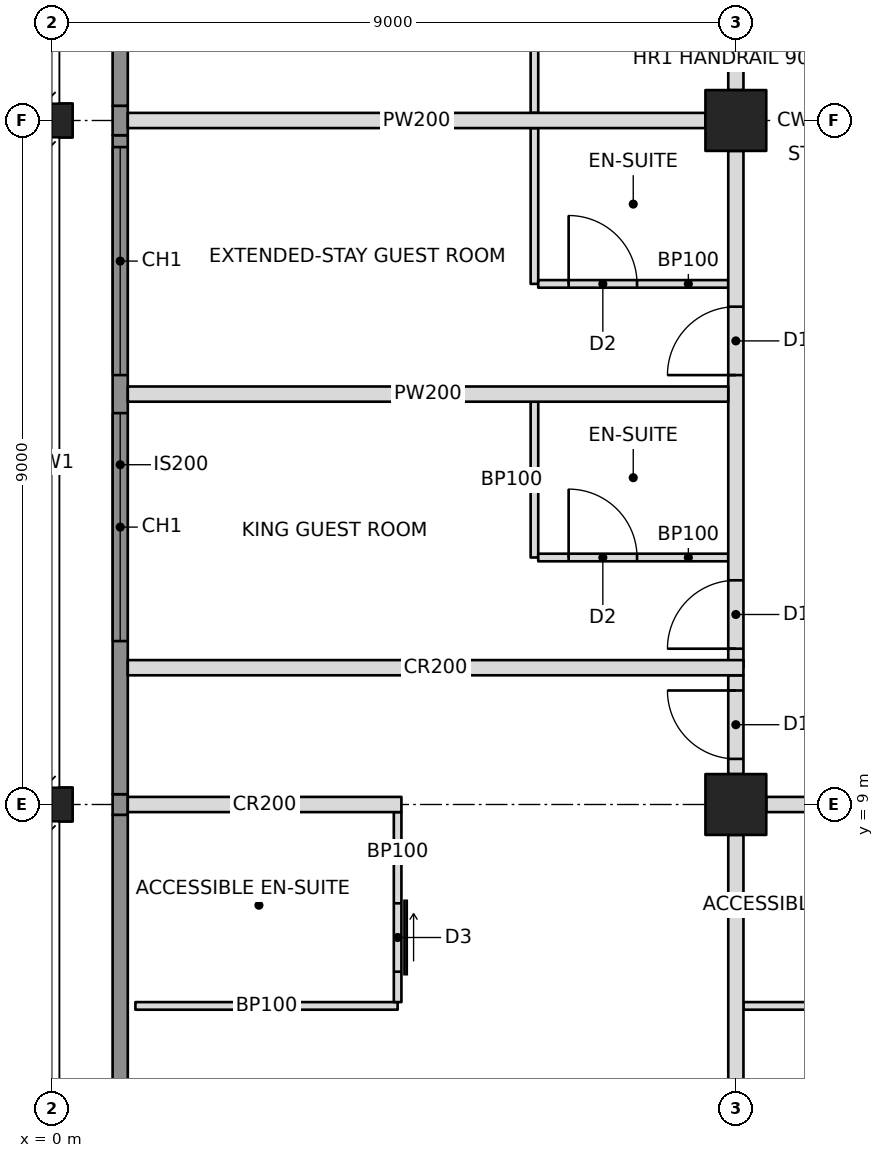
"""IFC4 building model, lengths in metres.
Left out: names, types, materials, properties, quantities, classifications, styles, units other than length and angle.
Written with IfcOpenShell. Run it as: python <this file> out.ifc"""

import sys

from ifc_helpers import new_model, si_unit, direction, frame, frame_2d, origin, origin_2d, place, context, subcontext, project, spatial, rectangle, hollow_rectangle, i_section, extrude, element, fill, save


model = new_model("IFC4")
c1 = context("Model", 3, precision=1e-05, world=origin(), true_north=direction((0.0, 1.0)))
c2 = subcontext(c1, "Body", "Model", "MODEL_VIEW")
j1 = project(units=[si_unit("LENGTHUNIT", "METRE"), si_unit("PLANEANGLEUNIT", "RADIAN")], contexts=[c1])
p1 = place(None, origin())
s1 = spatial("IfcSite", under=j1, at=p1, CompositionType="ELEMENT")
p2 = place(p1, origin())
s2 = spatial("IfcBuilding", under=s1, at=p2, CompositionType="ELEMENT")
p3 = place(p2, frame((0.0, 0.0, 170.6)))
s3 = spatial("IfcBuildingStorey", under=s2, at=p3, CompositionType="ELEMENT", Elevation=170.6)
for number, where, z_axis, x_axis in (
    (1, (0.0, 9.0, 0.0), (0.0, 0.0, 1.0), (0.0, 1.0, 0.0)),
    (2, (0.0, 18.0, 0.0), (0.0, 0.0, 1.0), (0.0, 1.0, 0.0)),
):
    element("IfcColumn", number, at=place(p3, frame(where, z_axis=z_axis, x_axis=x_axis)), inside=s3, PredefinedType="COLUMN", context=c2, shape_type="SweptSolid", body=[
        extrude(i_section(OverallWidth=0.449, OverallDepth=0.549, WebThickness=0.072, FlangeThickness=0.115, at=origin_2d()), origin(), (0.0, 0.0, 1.0), 3.4),
    ])
for number, where, z_axis, x_axis in (
    (3, (9.0, 9.0, 0.0), (0.0, 0.0, 1.0), (1.0, 0.0, 0.0)),
    (4, (9.0, 18.0, 0.0), (0.0, 0.0, 1.0), (1.0, 0.0, 0.0)),
):
    element("IfcColumn", number, at=place(p3, frame(where, z_axis=z_axis, x_axis=x_axis)), inside=s3, PredefinedType="COLUMN", context=c2, shape_type="SweptSolid", body=[
        extrude(hollow_rectangle(XDim=0.8, YDim=0.8, WallThickness=0.06, at=origin_2d()), origin(), (0.0, 0.0, 1.0), 3.4),
    ])
p4 = place(p3, frame((1.0, 9.0, 0.0), z_axis=(0.0, 0.0, 1.0), x_axis=(1.0, 0.0, 0.0)))
e5 = element("IfcWall", 5, at=p4, inside=s3, PredefinedType="PARTITIONING", context=c2, shape_type="SweptSolid", body=[
    extrude(rectangle(XDim=3.6, YDim=0.2, at=frame_2d((1.8, 0.0))), origin(), (0.0, 0.0, 1.0), 2.438),
])
p5 = place(p3, frame((9.4, 9.0, 0.0), z_axis=(0.0, 0.0, 1.0), x_axis=(1.0, 0.0, 0.0)))
e6 = element("IfcWall", 6, at=p5, inside=s3, PredefinedType="PARTITIONING", context=c2, shape_type="SweptSolid", body=[
    extrude(rectangle(XDim=8.2, YDim=0.2, at=frame_2d((4.1, 0.0))), origin(), (0.0, 0.0, 1.0), 2.405),
])
p6 = place(p5, frame((2.95, 0.0, 0.0)))
e7 = element("IfcOpeningElement", 7, at=p6, cuts=e6, PredefinedType="OPENING", context=c2, shape_type="SweptSolid", body=[
    extrude(rectangle(XDim=0.9, YDim=2.1, at=frame_2d((0.45, 1.05))), frame((0.0, 0.11, 0.0), z_axis=(0.0, -1.0, 0.0), x_axis=(1.0, 0.0, 0.0)), (0.0, 0.0, 1.0), 0.22),
])
p7 = place(p5, frame((4.35, 0.0, 0.0)))
e8 = element("IfcOpeningElement", 8, at=p7, cuts=e6, PredefinedType="OPENING", context=c2, shape_type="SweptSolid", body=[
    extrude(rectangle(XDim=0.9, YDim=2.1, at=frame_2d((0.45, 1.05))), frame((0.0, 0.11, 0.0), z_axis=(0.0, -1.0, 0.0), x_axis=(1.0, 0.0, 0.0)), (0.0, 0.0, 1.0), 0.22),
])
p8 = place(p3, frame((9.0, 10.8, 0.0), z_axis=(0.0, 0.0, 1.0), x_axis=(0.0, 1.0, 0.0)))
e9 = element("IfcWall", 9, at=p8, inside=s3, PredefinedType="PARTITIONING", context=c2, shape_type="SweptSolid", body=[
    extrude(rectangle(XDim=6.8, YDim=0.2, at=frame_2d((3.4, 0.0))), origin(), (0.0, 0.0, 1.0), 2.405),
])
p9 = place(p8, frame((0.25, 0.0, 0.0)))
e10 = element("IfcOpeningElement", 10, at=p9, cuts=e9, PredefinedType="OPENING", context=c2, shape_type="SweptSolid", body=[
    extrude(rectangle(XDim=0.9, YDim=2.1, at=frame_2d((0.45, 1.05))), frame((0.0, 0.11, 0.0), z_axis=(0.0, -1.0, 0.0), x_axis=(1.0, 0.0, 0.0)), (0.0, 0.0, 1.0), 0.22),
])
p10 = place(p8, frame((3.85, 0.0, 0.0)))
e11 = element("IfcOpeningElement", 11, at=p10, cuts=e9, PredefinedType="OPENING", context=c2, shape_type="SweptSolid", body=[
    extrude(rectangle(XDim=0.9, YDim=2.1, at=frame_2d((0.45, 1.05))), frame((0.0, 0.11, 0.0), z_axis=(0.0, -1.0, 0.0), x_axis=(1.0, 0.0, 0.0)), (0.0, 0.0, 1.0), 0.22),
])
p11 = place(p3, frame((9.0, 18.4, 0.0), z_axis=(0.0, 0.0, 1.0), x_axis=(0.0, 1.0, 0.0)))
e12 = element("IfcWall", 12, at=p11, inside=s3, PredefinedType="PARTITIONING", context=c2, shape_type="SweptSolid", body=[
    extrude(rectangle(XDim=8.2, YDim=0.2, at=frame_2d((4.1, 0.0))), origin(), (0.0, 0.0, 1.0), 2.405),
])
p12 = place(p11, frame((5.65, 0.0, 0.0)))
e13 = element("IfcOpeningElement", 13, at=p12, cuts=e12, PredefinedType="OPENING", context=c2, shape_type="SweptSolid", body=[
    extrude(rectangle(XDim=0.9, YDim=2.1, at=frame_2d((0.45, 1.05))), frame((0.0, 0.11, 0.0), z_axis=(0.0, -1.0, 0.0), x_axis=(1.0, 0.0, 0.0)), (0.0, 0.0, 1.0), 0.22),
])
p13 = place(p3, frame((1.0, 10.8, 0.0), z_axis=(0.0, 0.0, 1.0), x_axis=(1.0, 0.0, 0.0)))
e14 = element("IfcWall", 14, at=p13, inside=s3, PredefinedType="PARTITIONING", context=c2, shape_type="SweptSolid", body=[
    extrude(rectangle(XDim=8.1, YDim=0.2, at=frame_2d((4.05, 0.0))), origin(), (0.0, 0.0, 1.0), 2.404),
])
p14 = place(p3, frame((9.0, 8.6, 0.0), z_axis=(0.0, 0.0, 1.0), x_axis=(0.0, -1.0, 0.0)))
e15 = element("IfcWall", 15, at=p14, inside=s3, PredefinedType="PARTITIONING", context=c2, shape_type="SweptSolid", body=[
    extrude(rectangle(XDim=7.6, YDim=0.2, at=frame_2d((3.8, 0.0))), origin(), (0.0, 0.0, 1.0), 2.438),
])
p15 = place(p3, frame((1.1, 6.35, 0.0), z_axis=(0.0, 0.0, 1.0), x_axis=(1.0, 0.0, 0.0)))
e16 = element("IfcWall", 16, at=p15, inside=s3, PredefinedType="PARTITIONING", context=c2, shape_type="SweptSolid", body=[
    extrude(rectangle(XDim=3.45, YDim=0.1, at=frame_2d((1.725, 0.0))), origin(), (0.0, 0.0, 1.0), 3.2),
])
p16 = place(p3, frame((4.55, 8.9, 0.0), z_axis=(0.0, 0.0, 1.0), x_axis=(0.0, -1.0, 0.0)))
e17 = element("IfcWall", 17, at=p16, inside=s3, PredefinedType="PARTITIONING", context=c2, shape_type="SweptSolid", body=[
    extrude(rectangle(XDim=2.5, YDim=0.1, at=frame_2d((1.25, 0.0))), origin(), (0.0, 0.0, 1.0), 2.438),
])
p17 = place(p16, frame((1.2, 0.0, 0.0)))
e18 = element("IfcOpeningElement", 18, at=p17, cuts=e17, PredefinedType="OPENING", context=c2, shape_type="SweptSolid", body=[
    extrude(rectangle(XDim=0.9, YDim=2.1, at=frame_2d((0.45, 1.05))), frame((0.0, 0.06, 0.0), z_axis=(0.0, -1.0, 0.0), x_axis=(1.0, 0.0, 0.0)), (0.0, 0.0, 1.0), 0.12),
])
p18 = place(p3, frame((9.1, 6.35, 0.0), z_axis=(0.0, 0.0, 1.0), x_axis=(1.0, 0.0, 0.0)))
e19 = element("IfcWall", 19, at=p18, inside=s3, PredefinedType="PARTITIONING", context=c2, shape_type="SweptSolid", body=[
    extrude(rectangle(XDim=2.95, YDim=0.1, at=frame_2d((1.475, 0.0))), origin(), (0.0, 0.0, 1.0), 2.438),
])
p19 = place(p3, frame((8.9, 14.4, 0.0), z_axis=(0.0, 0.0, 1.0), x_axis=(-1.0, 0.0, 0.0)))
e20 = element("IfcWall", 20, at=p19, inside=s3, PredefinedType="PARTITIONING", context=c2, shape_type="SweptSolid", body=[
    extrude(rectangle(XDim=7.9, YDim=0.2, at=frame_2d((3.95, 0.0))), origin(), (0.0, 0.0, 1.0), 2.404),
])
p20 = place(p3, frame((8.6, 18.0, 0.0), z_axis=(0.0, 0.0, 1.0), x_axis=(-1.0, 0.0, 0.0)))
e21 = element("IfcWall", 21, at=p20, inside=s3, PredefinedType="PARTITIONING", context=c2, shape_type="SweptSolid", body=[
    extrude(rectangle(XDim=7.6, YDim=0.2, at=frame_2d((3.8, 0.0))), origin(), (0.0, 0.0, 1.0), 2.405),
])
p21 = place(p3, frame((6.35, 12.25, 0.0), z_axis=(0.0, 0.0, 1.0), x_axis=(0.0, 1.0, 0.0)))
e22 = element("IfcWall", 22, at=p21, inside=s3, PredefinedType="PARTITIONING", context=c2, shape_type="SweptSolid", body=[
    extrude(rectangle(XDim=2.05, YDim=0.1, at=frame_2d((1.025, 0.0))), origin(), (0.0, 0.0, 1.0), 3.2),
])
p22 = place(p3, frame((8.9, 12.25, 0.0), z_axis=(0.0, 0.0, 1.0), x_axis=(-1.0, 0.0, 0.0)))
e23 = element("IfcWall", 23, at=p22, inside=s3, PredefinedType="PARTITIONING", context=c2, shape_type="SweptSolid", body=[
    extrude(rectangle(XDim=2.5, YDim=0.1, at=frame_2d((1.25, 0.0))), origin(), (0.0, 0.0, 1.0), 2.404),
])
p23 = place(p22, frame((1.2, 0.0, 0.0)))
e24 = element("IfcOpeningElement", 24, at=p23, cuts=e23, PredefinedType="OPENING", context=c2, shape_type="SweptSolid", body=[
    extrude(rectangle(XDim=0.9, YDim=2.1, at=frame_2d((0.45, 1.05))), frame((0.0, 0.06, 0.0), z_axis=(0.0, -1.0, 0.0), x_axis=(1.0, 0.0, 0.0)), (0.0, 0.0, 1.0), 0.12),
])
p24 = place(p3, frame((6.35, 15.85, 0.0), z_axis=(0.0, 0.0, 1.0), x_axis=(0.0, 1.0, 0.0)))
e25 = element("IfcWall", 25, at=p24, inside=s3, PredefinedType="PARTITIONING", context=c2, shape_type="SweptSolid", body=[
    extrude(rectangle(XDim=2.05, YDim=0.1, at=frame_2d((1.025, 0.0))), origin(), (0.0, 0.0, 1.0), 2.404),
])
p25 = place(p3, frame((8.9, 15.85, 0.0), z_axis=(0.0, 0.0, 1.0), x_axis=(-1.0, 0.0, 0.0)))
e26 = element("IfcWall", 26, at=p25, inside=s3, PredefinedType="PARTITIONING", context=c2, shape_type="SweptSolid", body=[
    extrude(rectangle(XDim=2.5, YDim=0.1, at=frame_2d((1.25, 0.0))), origin(), (0.0, 0.0, 1.0), 2.404),
])
p26 = place(p25, frame((1.2, 0.0, 0.0)))
e27 = element("IfcOpeningElement", 27, at=p26, cuts=e26, PredefinedType="OPENING", context=c2, shape_type="SweptSolid", body=[
    extrude(rectangle(XDim=0.9, YDim=2.1, at=frame_2d((0.45, 1.05))), frame((0.0, 0.06, 0.0), z_axis=(0.0, -1.0, 0.0), x_axis=(1.0, 0.0, 0.0)), (0.0, 0.0, 1.0), 0.12),
])
p27 = place(p3, frame((6.35, 18.1, 0.0), z_axis=(0.0, 0.0, 1.0), x_axis=(0.0, 1.0, 0.0)))
e28 = element("IfcWall", 28, at=p27, inside=s3, PredefinedType="PARTITIONING", context=c2, shape_type="SweptSolid", body=[
    extrude(rectangle(XDim=3.45, YDim=0.1, at=frame_2d((1.725, 0.0))), origin(), (0.0, 0.0, 1.0), 2.404),
])
p28 = place(p3, frame((9.0, 9.4, 0.0), z_axis=(0.0, 0.0, 1.0), x_axis=(0.0, 1.0, 0.0)))
e29 = element("IfcWall", 29, at=p28, inside=s3, PredefinedType="PARTITIONING", context=c2, shape_type="SweptSolid", body=[
    extrude(rectangle(XDim=1.3, YDim=0.2, at=frame_2d((0.65, 0.0))), origin(), (0.0, 0.0, 1.0), 2.405),
])
p29 = place(p28, frame((0.2, 0.0, 0.0)))
e30 = element("IfcOpeningElement", 30, at=p29, cuts=e29, PredefinedType="OPENING", context=c2, shape_type="SweptSolid", body=[
    extrude(rectangle(XDim=0.9, YDim=2.1, at=frame_2d((0.45, 1.05))), frame((0.0, 0.11, 0.0), z_axis=(0.0, -1.0, 0.0), x_axis=(1.0, 0.0, 0.0)), (0.0, 0.0, 1.0), 0.22),
])
p30 = place(p3, frame((0.9, 4.607, 0.0), z_axis=(0.0, 0.0, 1.0), x_axis=(0.0, 1.0, 0.0)))
e31 = element("IfcWall", 31, at=p30, inside=s3, PredefinedType="SOLIDWALL", context=c2, shape_type="SweptSolid", body=[
    extrude(rectangle(XDim=4.257, YDim=0.2, at=frame_2d((2.129, 0.0))), origin(), (0.0, 0.0, 1.0), 3.2),
])
p31 = place(p3, frame((0.9, 8.865, 0.0), z_axis=(0.0, 0.0, 1.0), x_axis=(0.0, 1.0, 0.0)))
e32 = element("IfcWall", 32, at=p31, inside=s3, PredefinedType="SOLIDWALL", context=c2, shape_type="SweptSolid", body=[
    extrude(rectangle(XDim=0.271, YDim=0.2, at=frame_2d((0.135, 0.0))), origin(), (0.0, 0.0, 1.0), 2.438),
])
p32 = place(p3, frame((0.9, 9.135, 0.0), z_axis=(0.0, 0.0, 1.0), x_axis=(0.0, 1.0, 0.0)))
e33 = element("IfcWall", 33, at=p32, inside=s3, PredefinedType="SOLIDWALL", context=c2, shape_type="SweptSolid", body=[
    extrude(rectangle(XDim=8.671, YDim=0.2, at=frame_2d((4.335, 0.0))), origin(), (0.0, 0.0, 1.0), 3.2),
])
p33 = place(p32, frame((2.015, 0.0, 0.6)))
e34 = element("IfcOpeningElement", 34, at=p33, cuts=e33, PredefinedType="OPENING", context=c2, shape_type="SweptSolid", body=[
    extrude(rectangle(XDim=3.0, YDim=2.2, at=frame_2d((1.5, 1.1))), frame((0.0, 0.11, 0.0), z_axis=(0.0, -1.0, 0.0), x_axis=(1.0, 0.0, 0.0)), (0.0, 0.0, 1.0), 0.22),
])
p34 = place(p32, frame((5.515, 0.0, 0.6)))
e35 = element("IfcOpeningElement", 35, at=p34, cuts=e33, PredefinedType="OPENING", context=c2, shape_type="SweptSolid", body=[
    extrude(rectangle(XDim=3.0, YDim=2.2, at=frame_2d((1.5, 1.1))), frame((0.0, 0.11, 0.0), z_axis=(0.0, -1.0, 0.0), x_axis=(1.0, 0.0, 0.0)), (0.0, 0.0, 1.0), 0.22),
])
p35 = place(p3, frame((0.9, 17.806, 0.0), z_axis=(0.0, 0.0, 1.0), x_axis=(0.0, 1.0, 0.0)))
e36 = element("IfcWall", 36, at=p35, inside=s3, PredefinedType="SOLIDWALL", context=c2, shape_type="SweptSolid", body=[
    extrude(rectangle(XDim=0.388, YDim=0.2, at=frame_2d((0.194, 0.0))), origin(), (0.0, 0.0, 1.0), 2.404),
])
p36 = place(p3, frame((0.9, 18.194, 0.0), z_axis=(0.0, 0.0, 1.0), x_axis=(0.0, 1.0, 0.0)))
e37 = element("IfcWall", 37, at=p36, inside=s3, PredefinedType="SOLIDWALL", context=c2, shape_type="SweptSolid", body=[
    extrude(rectangle(XDim=5.806, YDim=0.2, at=frame_2d((2.903, 0.0))), origin(), (0.0, 0.0, 1.0), 3.2),
])
p37 = place(p36, frame((1.356, 0.0, 0.6)))
e38 = element("IfcOpeningElement", 38, at=p37, cuts=e37, PredefinedType="OPENING", context=c2, shape_type="SweptSolid", body=[
    extrude(rectangle(XDim=3.0, YDim=2.2, at=frame_2d((1.5, 1.1))), frame((0.0, 0.11, 0.0), z_axis=(0.0, -1.0, 0.0), x_axis=(1.0, 0.0, 0.0)), (0.0, 0.0, 1.0), 0.22),
])
p38 = place(p33, origin())
e39 = element("IfcWindow", 39, at=p38, inside=s3, PartitioningType="TRIPLE_PANEL_VERTICAL", PredefinedType="WINDOW", context=c2, shape_type="SweptSolid", body=[
    extrude(rectangle(XDim=3.0, YDim=2.2, at=frame_2d((1.5, 1.1))), frame((0.0, 0.03, 0.0), z_axis=(0.0, -1.0, 0.0), x_axis=(1.0, 0.0, 0.0)), (0.0, 0.0, 1.0), 0.06),
])
fill(e34, e39)
p39 = place(p34, origin())
e40 = element("IfcWindow", 40, at=p39, inside=s3, PartitioningType="TRIPLE_PANEL_VERTICAL", PredefinedType="WINDOW", context=c2, shape_type="SweptSolid", body=[
    extrude(rectangle(XDim=3.0, YDim=2.2, at=frame_2d((1.5, 1.1))), frame((0.0, 0.03, 0.0), z_axis=(0.0, -1.0, 0.0), x_axis=(1.0, 0.0, 0.0)), (0.0, 0.0, 1.0), 0.06),
])
fill(e35, e40)
p40 = place(p17, origin())
e41 = element("IfcDoor", 41, at=p40, inside=s3, OperationType="SLIDING_TO_LEFT", PredefinedType="DOOR", context=c2, shape_type="SweptSolid", body=[
    extrude(rectangle(XDim=0.9, YDim=2.1, at=frame_2d((0.45, 1.05))), frame((0.0, 0.025, 0.0), z_axis=(0.0, -1.0, 0.0), x_axis=(1.0, 0.0, 0.0)), (0.0, 0.0, 1.0), 0.05),
])
fill(e18, e41)
p41 = place(p23, frame((0.9, 0.0, 0.0), z_axis=(0.0, 0.0, 1.0), x_axis=(-1.0, 0.0, 0.0)))
e42 = element("IfcDoor", 42, at=p41, inside=s3, OperationType="SINGLE_SWING_LEFT", PredefinedType="DOOR", context=c2, shape_type="SweptSolid", body=[
    extrude(rectangle(XDim=0.9, YDim=2.1, at=frame_2d((0.45, 1.05))), frame((0.0, 0.025, 0.0), z_axis=(0.0, -1.0, 0.0), x_axis=(1.0, 0.0, 0.0)), (0.0, 0.0, 1.0), 0.05),
])
fill(e24, e42)
p42 = place(p9, origin())
e43 = element("IfcDoor", 43, at=p42, inside=s3, OperationType="SINGLE_SWING_LEFT", PredefinedType="DOOR", context=c2, shape_type="SweptSolid", body=[
    extrude(rectangle(XDim=0.9, YDim=2.1, at=frame_2d((0.45, 1.05))), frame((0.0, 0.025, 0.0), z_axis=(0.0, -1.0, 0.0), x_axis=(1.0, 0.0, 0.0)), (0.0, 0.0, 1.0), 0.05),
])
fill(e10, e43)
p43 = place(p26, frame((0.9, 0.0, 0.0), z_axis=(0.0, 0.0, 1.0), x_axis=(-1.0, 0.0, 0.0)))
e44 = element("IfcDoor", 44, at=p43, inside=s3, OperationType="SINGLE_SWING_LEFT", PredefinedType="DOOR", context=c2, shape_type="SweptSolid", body=[
    extrude(rectangle(XDim=0.9, YDim=2.1, at=frame_2d((0.45, 1.05))), frame((0.0, 0.025, 0.0), z_axis=(0.0, -1.0, 0.0), x_axis=(1.0, 0.0, 0.0)), (0.0, 0.0, 1.0), 0.05),
])
fill(e27, e44)
p44 = place(p10, origin())
e45 = element("IfcDoor", 45, at=p44, inside=s3, OperationType="SINGLE_SWING_LEFT", PredefinedType="DOOR", context=c2, shape_type="SweptSolid", body=[
    extrude(rectangle(XDim=0.9, YDim=2.1, at=frame_2d((0.45, 1.05))), frame((0.0, 0.025, 0.0), z_axis=(0.0, -1.0, 0.0), x_axis=(1.0, 0.0, 0.0)), (0.0, 0.0, 1.0), 0.05),
])
fill(e11, e45)
p45 = place(p29, origin())
e46 = element("IfcDoor", 46, at=p45, inside=s3, OperationType="SINGLE_SWING_RIGHT", PredefinedType="DOOR", context=c2, shape_type="SweptSolid", body=[
    extrude(rectangle(XDim=0.9, YDim=2.1, at=frame_2d((0.45, 1.05))), frame((0.0, 0.025, 0.0), z_axis=(0.0, -1.0, 0.0), x_axis=(1.0, 0.0, 0.0)), (0.0, 0.0, 1.0), 0.05),
])
fill(e30, e46)
save(model, sys.argv[1])
